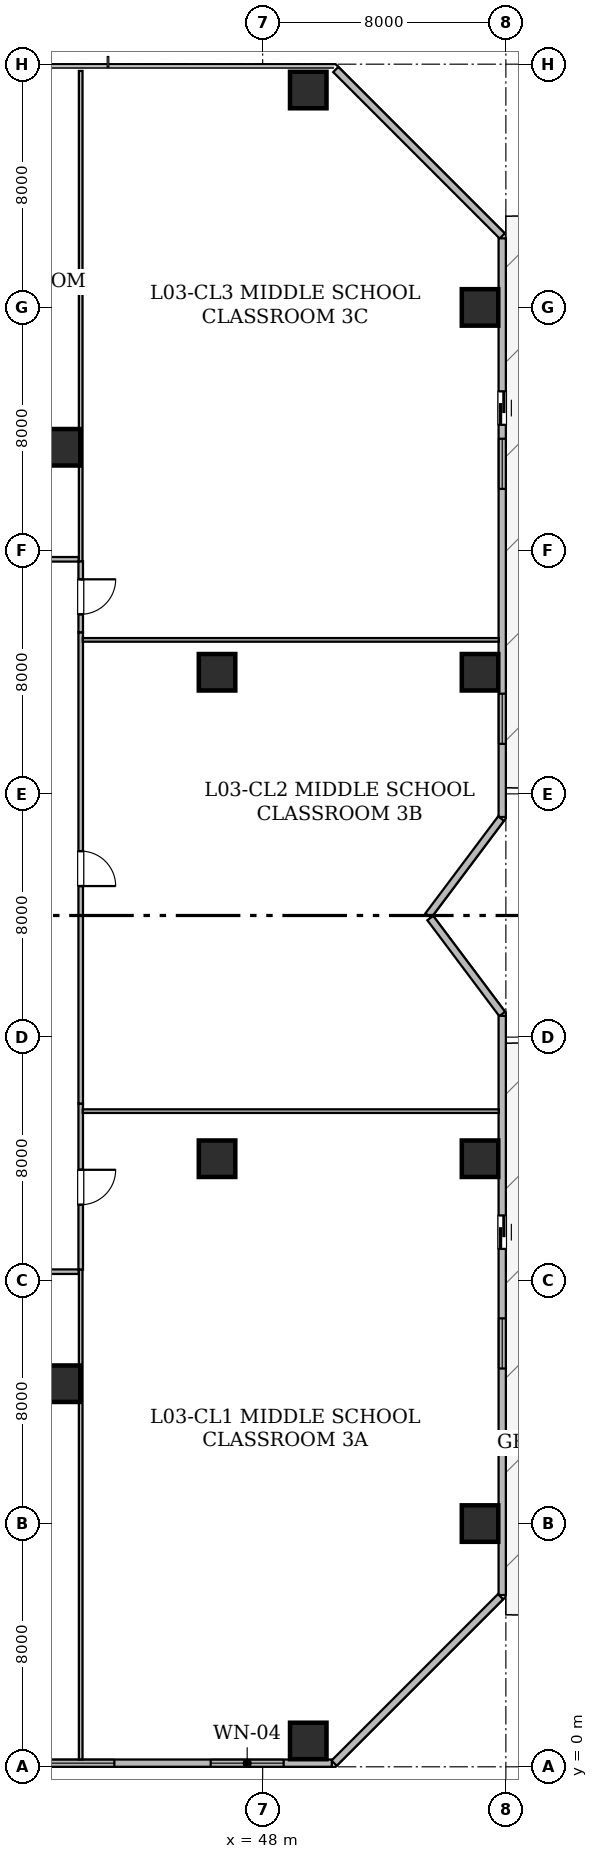
"""IFC4 building model, lengths in metres.
Left out: names, types, materials, properties, quantities, classifications, styles, units other than length and angle.
Written with IfcOpenShell. Run it as: python <this file> out.ifc"""

import sys

from ifc_helpers import new_model, si_unit, direction, frame, frame_2d, origin, origin_2d, place, context, subcontext, project, spatial, rectangle, hollow_rectangle, extrude, element, fill, save


model = new_model("IFC4")
c1 = context("Model", 3, precision=1e-05, world=origin(), true_north=direction((0.0, 1.0)))
c2 = subcontext(c1, "Body", "Model", "MODEL_VIEW")
j1 = project(units=[si_unit("LENGTHUNIT", "METRE"), si_unit("PLANEANGLEUNIT", "RADIAN")], contexts=[c1])
p1 = place(None, origin())
s1 = spatial("IfcSite", under=j1, at=p1, CompositionType="ELEMENT")
p2 = place(p1, origin())
s2 = spatial("IfcBuilding", under=s1, at=p2, CompositionType="ELEMENT")
p3 = place(p2, frame((0.0, 0.0, 16.2)))
s3 = spatial("IfcBuildingStorey", under=s2, at=p3, CompositionType="ELEMENT", Elevation=16.2)
for number, where, z_axis, x_axis in (
    (1, (49.5, 0.85, 0.0), (0.0, 0.0, 1.0), (1.0, 0.0, 0.0)),
    (2, (49.5, 55.15, 0.0), (0.0, 0.0, 1.0), (1.0, 0.0, 0.0)),
    (3, (55.15, 8.0, 0.0), (0.0, 0.0, 1.0), (1.0, 0.0, 0.0)),
    (4, (55.15, 20.0, 0.0), (0.0, 0.0, 1.0), (1.0, 0.0, 0.0)),
    (5, (55.15, 36.0, 0.0), (0.0, 0.0, 1.0), (1.0, 0.0, 0.0)),
    (6, (55.15, 48.0, 0.0), (0.0, 0.0, 1.0), (1.0, 0.0, 0.0)),
    (7, (41.4, 12.6, 0.0), (0.0, 0.0, 1.0), (1.0, 0.0, 0.0)),
    (8, (41.4, 43.4, 0.0), (0.0, 0.0, 1.0), (1.0, 0.0, 0.0)),
    (9, (46.5, 20.0, 0.0), (0.0, 0.0, 1.0), (1.0, 0.0, 0.0)),
    (10, (46.5, 36.0, 0.0), (0.0, 0.0, 1.0), (1.0, 0.0, 0.0)),
):
    element("IfcColumn", number, at=place(p3, frame(where, z_axis=z_axis, x_axis=x_axis)), inside=s3, PredefinedType="COLUMN", context=c2, shape_type="SweptSolid", body=[
        extrude(hollow_rectangle(XDim=1.2, YDim=1.2, WallThickness=0.06, at=origin_2d()), origin(), (0.0, 0.0, 1.0), 4.2),
    ])
p4 = place(p3, frame((50.405, 55.825, 0.0), z_axis=(0.0, 0.0, 1.0), x_axis=(0.707106781187, -0.707106781187, 0.0)))
e11 = element("IfcWall", 11, at=p4, inside=s3, PredefinedType="STANDARD", context=c2, shape_type="SweptSolid", body=[
    extrude(rectangle(XDim=7.743, YDim=0.24, at=frame_2d((3.871, 0.0))), origin(), (0.0, 0.0, 1.0), 3.92),
])
p5 = place(p3, frame((55.88, 50.272, 0.0), z_axis=(0.0, 0.0, 1.0), x_axis=(0.0, -1.0, 0.0)))
e12 = element("IfcWall", 12, at=p5, inside=s3, PredefinedType="STANDARD", context=c2, shape_type="SweptSolid", body=[
    extrude(rectangle(XDim=19.032, YDim=0.24, at=frame_2d((9.516, 0.0))), origin(), (0.0, 0.0, 1.0), 3.92),
])
p6 = place(p5, frame((5.033, 0.0, 0.0)))
e13 = element("IfcOpeningElement", 13, at=p6, cuts=e12, PredefinedType="OPENING", context=c2, shape_type="SweptSolid", body=[
    extrude(rectangle(XDim=1.1, YDim=2.2, at=frame_2d((0.55, 1.1))), frame((0.0, 0.13, 0.0), z_axis=(0.0, -1.0, 0.0), x_axis=(1.0, 0.0, 0.0)), (0.0, 0.0, 1.0), 0.26),
])
p7 = place(p5, frame((14.977, 0.0, 0.85)))
e14 = element("IfcOpeningElement", 14, at=p7, cuts=e12, PredefinedType="OPENING", context=c2, shape_type="SweptSolid", body=[
    extrude(rectangle(XDim=1.65, YDim=1.55, at=frame_2d((0.825, 0.775))), frame((0.0, 0.13, 0.0), z_axis=(0.0, -1.0, 0.0), x_axis=(1.0, 0.0, 0.0)), (0.0, 0.0, 1.0), 0.26),
])
p8 = place(p5, frame((6.591, 0.0, 0.85)))
e15 = element("IfcOpeningElement", 15, at=p8, cuts=e12, PredefinedType="OPENING", context=c2, shape_type="SweptSolid", body=[
    extrude(rectangle(XDim=1.65, YDim=1.55, at=frame_2d((0.825, 0.775))), frame((0.0, 0.13, 0.0), z_axis=(0.0, -1.0, 0.0), x_axis=(1.0, 0.0, 0.0)), (0.0, 0.0, 1.0), 0.26),
])
p9 = place(p3, frame((55.842, 31.189, 0.0), z_axis=(0.0, 0.0, 1.0), x_axis=(-0.600058791648, -0.799955902889, 0.0)))
e16 = element("IfcWall", 16, at=p9, inside=s3, PredefinedType="STANDARD", context=c2, shape_type="SweptSolid", body=[
    extrude(rectangle(XDim=3.986, YDim=0.24, at=frame_2d((1.993, 0.0))), origin(), (0.0, 0.0, 1.0), 3.92),
])
p10 = place(p3, frame((53.513, 27.916, 0.0), z_axis=(0.0, 0.0, 1.0), x_axis=(0.599990098106, -0.800007426325, 0.0)))
e17 = element("IfcWall", 17, at=p10, inside=s3, PredefinedType="STANDARD", context=c2, shape_type="SweptSolid", body=[
    extrude(rectangle(XDim=3.945, YDim=0.24, at=frame_2d((1.973, 0.0))), origin(), (0.0, 0.0, 1.0), 3.92),
])
p11 = place(p3, frame((55.88, 24.698, 0.0), z_axis=(0.0, 0.0, 1.0), x_axis=(0.0, -1.0, 0.0)))
e18 = element("IfcWall", 18, at=p11, inside=s3, PredefinedType="STANDARD", context=c2, shape_type="SweptSolid", body=[
    extrude(rectangle(XDim=19.048, YDim=0.24, at=frame_2d((9.524, 0.0))), origin(), (0.0, 0.0, 1.0), 3.92),
])
p12 = place(p11, frame((6.564, 0.0, 0.0)))
e19 = element("IfcOpeningElement", 19, at=p12, cuts=e18, PredefinedType="OPENING", context=c2, shape_type="SweptSolid", body=[
    extrude(rectangle(XDim=1.1, YDim=2.2, at=frame_2d((0.55, 1.1))), frame((0.0, 0.13, 0.0), z_axis=(0.0, -1.0, 0.0), x_axis=(1.0, 0.0, 0.0)), (0.0, 0.0, 1.0), 0.26),
])
p13 = place(p11, frame((9.948, 0.0, 0.85)))
e20 = element("IfcOpeningElement", 20, at=p13, cuts=e18, PredefinedType="OPENING", context=c2, shape_type="SweptSolid", body=[
    extrude(rectangle(XDim=1.65, YDim=1.55, at=frame_2d((0.825, 0.775))), frame((0.0, 0.13, 0.0), z_axis=(0.0, -1.0, 0.0), x_axis=(1.0, 0.0, 0.0)), (0.0, 0.0, 1.0), 0.26),
])
p14 = place(p3, frame((55.826, 5.596, 0.0), z_axis=(0.0, 0.0, 1.0), x_axis=(-0.707106781187, -0.707106781187, 0.0)))
e21 = element("IfcWall", 21, at=p14, inside=s3, PredefinedType="STANDARD", context=c2, shape_type="SweptSolid", body=[
    extrude(rectangle(XDim=7.744, YDim=0.24, at=frame_2d((3.872, 0.0))), origin(), (0.0, 0.0, 1.0), 3.92),
])
p15 = place(p3, frame((50.275, 0.12, 0.0), z_axis=(0.0, 0.0, 1.0), x_axis=(-1.0, 0.0, 0.0)))
e22 = element("IfcWall", 22, at=p15, inside=s3, PredefinedType="STANDARD", context=c2, shape_type="SweptSolid", body=[
    extrude(rectangle(XDim=44.55, YDim=0.24, at=frame_2d((22.275, 0.0))), origin(), (0.0, 0.0, 1.0), 3.92),
])
p16 = place(p15, frame((1.584, 0.0, 0.9)))
e23 = element("IfcOpeningElement", 23, at=p16, cuts=e22, PredefinedType="OPENING", context=c2, shape_type="SweptSolid", body=[
    extrude(rectangle(XDim=2.4, YDim=1.7, at=frame_2d((1.2, 0.85))), frame((0.0, 0.13, 0.0), z_axis=(0.0, -1.0, 0.0), x_axis=(1.0, 0.0, 0.0)), (0.0, 0.0, 1.0), 0.26),
])
p17 = place(p15, frame((7.153, 0.0, 0.9)))
e24 = element("IfcOpeningElement", 24, at=p17, cuts=e22, PredefinedType="OPENING", context=c2, shape_type="SweptSolid", body=[
    extrude(rectangle(XDim=2.4, YDim=1.7, at=frame_2d((1.2, 0.85))), frame((0.0, 0.13, 0.0), z_axis=(0.0, -1.0, 0.0), x_axis=(1.0, 0.0, 0.0)), (0.0, 0.0, 1.0), 0.26),
])
p18 = place(p15, frame((12.722, 0.0, 0.9)))
e25 = element("IfcOpeningElement", 25, at=p18, cuts=e22, PredefinedType="OPENING", context=c2, shape_type="SweptSolid", body=[
    extrude(rectangle(XDim=2.4, YDim=1.7, at=frame_2d((1.2, 0.85))), frame((0.0, 0.13, 0.0), z_axis=(0.0, -1.0, 0.0), x_axis=(1.0, 0.0, 0.0)), (0.0, 0.0, 1.0), 0.26),
])
p19 = place(p15, frame((18.291, 0.0, 0.9)))
e26 = element("IfcOpeningElement", 26, at=p19, cuts=e22, PredefinedType="OPENING", context=c2, shape_type="SweptSolid", body=[
    extrude(rectangle(XDim=2.4, YDim=1.7, at=frame_2d((1.2, 0.85))), frame((0.0, 0.13, 0.0), z_axis=(0.0, -1.0, 0.0), x_axis=(1.0, 0.0, 0.0)), (0.0, 0.0, 1.0), 0.26),
])
p20 = place(p15, frame((23.859, 0.0, 0.9)))
e27 = element("IfcOpeningElement", 27, at=p20, cuts=e22, PredefinedType="OPENING", context=c2, shape_type="SweptSolid", body=[
    extrude(rectangle(XDim=2.4, YDim=1.7, at=frame_2d((1.2, 0.85))), frame((0.0, 0.13, 0.0), z_axis=(0.0, -1.0, 0.0), x_axis=(1.0, 0.0, 0.0)), (0.0, 0.0, 1.0), 0.26),
])
p21 = place(p15, frame((29.428, 0.0, 0.9)))
e28 = element("IfcOpeningElement", 28, at=p21, cuts=e22, PredefinedType="OPENING", context=c2, shape_type="SweptSolid", body=[
    extrude(rectangle(XDim=2.4, YDim=1.7, at=frame_2d((1.2, 0.85))), frame((0.0, 0.13, 0.0), z_axis=(0.0, -1.0, 0.0), x_axis=(1.0, 0.0, 0.0)), (0.0, 0.0, 1.0), 0.26),
])
p22 = place(p15, frame((34.997, 0.0, 0.9)))
e29 = element("IfcOpeningElement", 29, at=p22, cuts=e22, PredefinedType="OPENING", context=c2, shape_type="SweptSolid", body=[
    extrude(rectangle(XDim=2.4, YDim=1.7, at=frame_2d((1.2, 0.85))), frame((0.0, 0.13, 0.0), z_axis=(0.0, -1.0, 0.0), x_axis=(1.0, 0.0, 0.0)), (0.0, 0.0, 1.0), 0.26),
])
p23 = place(p15, frame((40.566, 0.0, 0.9)))
e30 = element("IfcOpeningElement", 30, at=p23, cuts=e22, PredefinedType="OPENING", context=c2, shape_type="SweptSolid", body=[
    extrude(rectangle(XDim=2.4, YDim=1.7, at=frame_2d((1.2, 0.85))), frame((0.0, 0.13, 0.0), z_axis=(0.0, -1.0, 0.0), x_axis=(1.0, 0.0, 0.0)), (0.0, 0.0, 1.0), 0.26),
])
p24 = place(p3, frame((42.015, 21.814, 0.0), z_axis=(0.0, 0.0, 1.0), x_axis=(0.0, -1.0, 0.0)))
e31 = element("IfcWall", 31, at=p24, inside=s3, PredefinedType="STANDARD", context=c2, shape_type="SweptSolid", body=[
    extrude(rectangle(XDim=5.464, YDim=0.15, at=frame_2d((2.732, 0.0))), origin(), (0.0, 0.0, 1.0), 3.055),
])
p25 = place(p24, frame((2.178, 0.0, 0.0)))
e32 = element("IfcOpeningElement", 32, at=p25, cuts=e31, PredefinedType="OPENING", context=c2, shape_type="SweptSolid", body=[
    extrude(rectangle(XDim=1.15, YDim=2.2, at=frame_2d((0.575, 1.1))), frame((0.0, 0.085, 0.0), z_axis=(0.0, -1.0, 0.0), x_axis=(1.0, 0.0, 0.0)), (0.0, 0.0, 1.0), 0.17),
])
p26 = place(p3, frame((42.015, 37.314, 0.0), z_axis=(0.0, 0.0, 1.0), x_axis=(0.0, -1.0, 0.0)))
e33 = element("IfcWall", 33, at=p26, inside=s3, PredefinedType="STANDARD", context=c2, shape_type="SweptSolid", body=[
    extrude(rectangle(XDim=15.5, YDim=0.15, at=frame_2d((7.75, 0.0))), origin(), (0.0, 0.0, 1.0), 3.055),
])
p27 = place(p26, frame((7.196, 0.0, 0.0)))
e34 = element("IfcOpeningElement", 34, at=p27, cuts=e33, PredefinedType="OPENING", context=c2, shape_type="SweptSolid", body=[
    extrude(rectangle(XDim=1.15, YDim=2.2, at=frame_2d((0.575, 1.1))), frame((0.0, 0.085, 0.0), z_axis=(0.0, -1.0, 0.0), x_axis=(1.0, 0.0, 0.0)), (0.0, 0.0, 1.0), 0.17),
])
p28 = place(p3, frame((42.015, 39.65, 0.0), z_axis=(0.0, 0.0, 1.0), x_axis=(0.0, -1.0, 0.0)))
e35 = element("IfcWall", 35, at=p28, inside=s3, PredefinedType="STANDARD", context=c2, shape_type="SweptSolid", body=[
    extrude(rectangle(XDim=2.336, YDim=0.15, at=frame_2d((1.168, 0.0))), origin(), (0.0, 0.0, 1.0), 3.447),
])
p29 = place(p28, frame((0.593, 0.0, 0.0)))
e36 = element("IfcOpeningElement", 36, at=p29, cuts=e35, PredefinedType="OPENING", context=c2, shape_type="SweptSolid", body=[
    extrude(rectangle(XDim=1.15, YDim=2.2, at=frame_2d((0.575, 1.1))), frame((0.0, 0.085, 0.0), z_axis=(0.0, -1.0, 0.0), x_axis=(1.0, 0.0, 0.0)), (0.0, 0.0, 1.0), 0.17),
])
p30 = place(p3, frame((41.95, 16.285, 0.0), z_axis=(0.0, 0.0, 1.0), x_axis=(-1.0, 0.0, 0.0)))
e37 = element("IfcWall", 37, at=p30, inside=s3, PredefinedType="STANDARD", context=c2, shape_type="SweptSolid", body=[
    extrude(rectangle(XDim=15.7, YDim=0.15, at=frame_2d((7.85, 0.0))), origin(), (0.0, 0.0, 1.0), 3.055),
])
p31 = place(p30, frame((7.4, 0.0, 0.0)))
e38 = element("IfcOpeningElement", 38, at=p31, cuts=e37, PredefinedType="OPENING", context=c2, shape_type="SweptSolid", body=[
    extrude(rectangle(XDim=0.9, YDim=2.1, at=frame_2d((0.45, 1.05))), frame((0.0, 0.085, 0.0), z_axis=(0.0, -1.0, 0.0), x_axis=(1.0, 0.0, 0.0)), (0.0, 0.0, 1.0), 0.17),
])
p32 = place(p3, frame((28.852, 39.715, 0.0), z_axis=(0.0, 0.0, 1.0), x_axis=(1.0, 0.0, 0.0)))
e39 = element("IfcWall", 39, at=p32, inside=s3, PredefinedType="STANDARD", context=c2, shape_type="SweptSolid", body=[
    extrude(rectangle(XDim=13.098, YDim=0.15, at=frame_2d((6.549, 0.0))), origin(), (0.0, 0.0, 1.0), 3.055),
])
p33 = place(p32, frame((5.974, 0.0, 0.0)))
e40 = element("IfcOpeningElement", 40, at=p33, cuts=e39, PredefinedType="OPENING", context=c2, shape_type="SweptSolid", body=[
    extrude(rectangle(XDim=1.15, YDim=2.2, at=frame_2d((0.575, 1.1))), frame((0.0, 0.085, 0.0), z_axis=(0.0, -1.0, 0.0), x_axis=(1.0, 0.0, 0.0)), (0.0, 0.0, 1.0), 0.17),
])
p34 = place(p3, frame((42.082, 21.565, 0.0), z_axis=(0.0, 0.0, 1.0), x_axis=(1.0, 0.0, 0.0)))
e41 = element("IfcWall", 41, at=p34, inside=s3, PredefinedType="PARTITIONING", context=c2, shape_type="SweptSolid", body=[
    extrude(rectangle(XDim=13.686, YDim=0.12, at=frame_2d((6.843, 0.0))), origin(), (0.0, 0.0, 1.0), 3.055),
])
p35 = place(p3, frame((42.015, 0.243, 0.0), z_axis=(0.0, 0.0, 1.0), x_axis=(0.0, 1.0, 0.0)))
e42 = element("IfcWall", 42, at=p35, inside=s3, PredefinedType="PARTITIONING", context=c2, shape_type="SweptSolid", body=[
    extrude(rectangle(XDim=16.107, YDim=0.12, at=frame_2d((8.054, 0.0))), origin(), (0.0, 0.0, 1.0), 3.055),
])
p36 = place(p3, frame((42.082, 37.065, 0.0), z_axis=(0.0, 0.0, 1.0), x_axis=(1.0, 0.0, 0.0)))
e43 = element("IfcWall", 43, at=p36, inside=s3, PredefinedType="PARTITIONING", context=c2, shape_type="SweptSolid", body=[
    extrude(rectangle(XDim=13.686, YDim=0.12, at=frame_2d((6.843, 0.0))), origin(), (0.0, 0.0, 1.0), 3.055),
])
p37 = place(p3, frame((42.015, 39.65, 0.0), z_axis=(0.0, 0.0, 1.0), x_axis=(0.0, 1.0, 0.0)))
e44 = element("IfcWall", 44, at=p37, inside=s3, PredefinedType="PARTITIONING", context=c2, shape_type="SweptSolid", body=[
    extrude(rectangle(XDim=16.128, YDim=0.12, at=frame_2d((8.064, 0.0))), origin(), (0.0, 0.0, 1.0), 3.055),
])
p38 = place(p6, origin())
e45 = element("IfcDoor", 45, at=p38, inside=s3, OperationType="SLIDING_TO_LEFT", PredefinedType="DOOR", context=c2, shape_type="SweptSolid", body=[
    extrude(rectangle(XDim=1.1, YDim=2.2, at=frame_2d((0.55, 1.1))), frame((0.0, 0.025, 0.0), z_axis=(0.0, -1.0, 0.0), x_axis=(1.0, 0.0, 0.0)), (0.0, 0.0, 1.0), 0.05),
])
fill(e13, e45)
p39 = place(p12, origin())
e46 = element("IfcDoor", 46, at=p39, inside=s3, OperationType="SLIDING_TO_LEFT", PredefinedType="DOOR", context=c2, shape_type="SweptSolid", body=[
    extrude(rectangle(XDim=1.1, YDim=2.2, at=frame_2d((0.55, 1.1))), frame((0.0, 0.025, 0.0), z_axis=(0.0, -1.0, 0.0), x_axis=(1.0, 0.0, 0.0)), (0.0, 0.0, 1.0), 0.05),
])
fill(e19, e46)
p40 = place(p13, origin())
e47 = element("IfcWindow", 47, at=p40, inside=s3, PartitioningType="SINGLE_PANEL", PredefinedType="WINDOW", context=c2, shape_type="SweptSolid", body=[
    extrude(rectangle(XDim=1.65, YDim=1.55, at=frame_2d((0.825, 0.775))), frame((0.0, 0.03, 0.0), z_axis=(0.0, -1.0, 0.0), x_axis=(1.0, 0.0, 0.0)), (0.0, 0.0, 1.0), 0.06),
])
fill(e20, e47)
p41 = place(p7, origin())
e48 = element("IfcWindow", 48, at=p41, inside=s3, PartitioningType="SINGLE_PANEL", PredefinedType="WINDOW", context=c2, shape_type="SweptSolid", body=[
    extrude(rectangle(XDim=1.65, YDim=1.55, at=frame_2d((0.825, 0.775))), frame((0.0, 0.03, 0.0), z_axis=(0.0, -1.0, 0.0), x_axis=(1.0, 0.0, 0.0)), (0.0, 0.0, 1.0), 0.06),
])
fill(e14, e48)
p42 = place(p8, origin())
e49 = element("IfcWindow", 49, at=p42, inside=s3, PartitioningType="SINGLE_PANEL", PredefinedType="WINDOW", context=c2, shape_type="SweptSolid", body=[
    extrude(rectangle(XDim=1.65, YDim=1.55, at=frame_2d((0.825, 0.775))), frame((0.0, 0.03, 0.0), z_axis=(0.0, -1.0, 0.0), x_axis=(1.0, 0.0, 0.0)), (0.0, 0.0, 1.0), 0.06),
])
fill(e15, e49)
p43 = place(p16, origin())
e50 = element("IfcWindow", 50, at=p43, inside=s3, PartitioningType="SINGLE_PANEL", PredefinedType="WINDOW", context=c2, shape_type="SweptSolid", body=[
    extrude(rectangle(XDim=2.4, YDim=1.7, at=frame_2d((1.2, 0.85))), frame((0.0, 0.03, 0.0), z_axis=(0.0, -1.0, 0.0), x_axis=(1.0, 0.0, 0.0)), (0.0, 0.0, 1.0), 0.06),
])
fill(e23, e50)
p44 = place(p17, origin())
e51 = element("IfcWindow", 51, at=p44, inside=s3, PartitioningType="SINGLE_PANEL", PredefinedType="WINDOW", context=c2, shape_type="SweptSolid", body=[
    extrude(rectangle(XDim=2.4, YDim=1.7, at=frame_2d((1.2, 0.85))), frame((0.0, 0.03, 0.0), z_axis=(0.0, -1.0, 0.0), x_axis=(1.0, 0.0, 0.0)), (0.0, 0.0, 1.0), 0.06),
])
fill(e24, e51)
p45 = place(p25, origin())
e52 = element("IfcDoor", 52, at=p45, inside=s3, OperationType="SINGLE_SWING_LEFT", PredefinedType="DOOR", context=c2, shape_type="SweptSolid", body=[
    extrude(rectangle(XDim=1.15, YDim=2.2, at=frame_2d((0.575, 1.1))), frame((0.0, 0.025, 0.0), z_axis=(0.0, -1.0, 0.0), x_axis=(1.0, 0.0, 0.0)), (0.0, 0.0, 1.0), 0.05),
])
fill(e32, e52)
p46 = place(p27, origin())
e53 = element("IfcDoor", 53, at=p46, inside=s3, OperationType="SINGLE_SWING_RIGHT", PredefinedType="DOOR", context=c2, shape_type="SweptSolid", body=[
    extrude(rectangle(XDim=1.15, YDim=2.2, at=frame_2d((0.575, 1.1))), frame((0.0, 0.025, 0.0), z_axis=(0.0, -1.0, 0.0), x_axis=(1.0, 0.0, 0.0)), (0.0, 0.0, 1.0), 0.05),
])
fill(e34, e53)
p47 = place(p29, origin())
e54 = element("IfcDoor", 54, at=p47, inside=s3, OperationType="SINGLE_SWING_LEFT", PredefinedType="DOOR", context=c2, shape_type="SweptSolid", body=[
    extrude(rectangle(XDim=1.15, YDim=2.2, at=frame_2d((0.575, 1.1))), frame((0.0, 0.025, 0.0), z_axis=(0.0, -1.0, 0.0), x_axis=(1.0, 0.0, 0.0)), (0.0, 0.0, 1.0), 0.05),
])
fill(e36, e54)
save(model, sys.argv[1])
